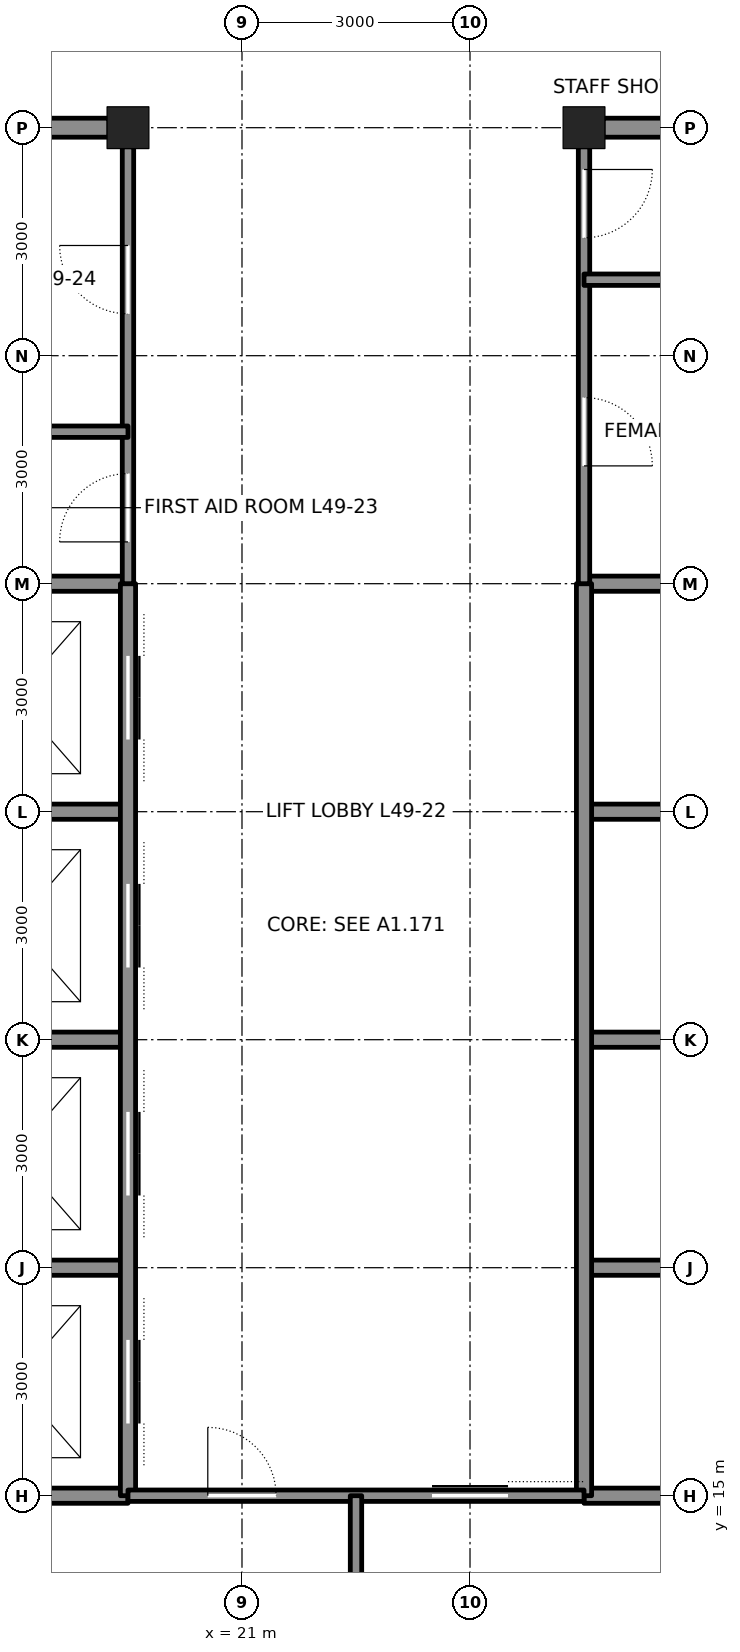
"""IFC4 building model, lengths in metres.
Left out: names, types, materials, properties, quantities, classifications, styles, units other than length and angle.
Written with IfcOpenShell. Run it as: python <this file> out.ifc"""

import sys

from ifc_helpers import new_model, si_unit, direction, frame, frame_2d, origin, origin_2d, place, context, subcontext, project, spatial, rectangle, hollow_rectangle, extrude, element, fill, save


model = new_model("IFC4")
c1 = context("Model", 3, precision=1e-05, world=origin(), true_north=direction((0.0, 1.0)))
c2 = subcontext(c1, "Body", "Model", "MODEL_VIEW")
j1 = project(units=[si_unit("LENGTHUNIT", "METRE"), si_unit("PLANEANGLEUNIT", "RADIAN")], contexts=[c1])
p1 = place(None, origin())
s1 = spatial("IfcSite", under=j1, at=p1, CompositionType="ELEMENT")
p2 = place(p1, origin())
s2 = spatial("IfcBuilding", under=s1, at=p2, CompositionType="ELEMENT")
p3 = place(p2, frame((0.0, 0.0, 222.3)))
s3 = spatial("IfcBuildingStorey", under=s2, at=p3, CompositionType="ELEMENT", Elevation=222.3)
for number, where, z_axis, x_axis in (
    (1, (19.5, 33.0, 0.0), (0.0, 0.0, 1.0), (1.0, 0.0, 0.0)),
    (2, (25.5, 33.0, 0.0), (0.0, 0.0, 1.0), (1.0, 0.0, 0.0)),
):
    element("IfcColumn", number, at=place(p3, frame(where, z_axis=z_axis, x_axis=x_axis)), inside=s3, PredefinedType="COLUMN", context=c2, shape_type="SweptSolid", body=[
        extrude(hollow_rectangle(XDim=0.55, YDim=0.55, WallThickness=0.045, at=origin_2d()), origin(), (0.0, 0.0, 1.0), 4.2),
    ])
for number, where, z_axis, x_axis in (
    (3, (12.0, 15.0, 0.0), (0.0, 0.0, 1.0), (1.0, 0.0, 0.0)),
    (4, (25.5, 15.0, 0.0), (0.0, 0.0, 1.0), (1.0, 0.0, 0.0)),
):
    element("IfcWall", number, at=place(p3, frame(where, z_axis=z_axis, x_axis=x_axis)), inside=s3, PredefinedType="SOLIDWALL", context=c2, shape_type="SweptSolid", body=[
        extrude(rectangle(XDim=7.5, YDim=0.2, at=frame_2d((3.75, 0.0))), origin(), (0.0, 0.0, 1.0), 4.04),
    ])
for number, where, z_axis, x_axis in (
    (5, (16.75, 24.0, 0.0), (0.0, 0.0, 1.0), (1.0, 0.0, 0.0)),
    (6, (25.5, 24.0, 0.0), (0.0, 0.0, 1.0), (1.0, 0.0, 0.0)),
):
    element("IfcWall", number, at=place(p3, frame(where, z_axis=z_axis, x_axis=x_axis)), inside=s3, PredefinedType="SOLIDWALL", context=c2, shape_type="SweptSolid", body=[
        extrude(rectangle(XDim=2.75, YDim=0.2, at=frame_2d((1.375, 0.0))), origin(), (0.0, 0.0, 1.0), 3.09),
    ])
p4 = place(p3, frame((12.0, 27.0, 0.0), z_axis=(0.0, 0.0, 1.0), x_axis=(1.0, 0.0, 0.0)))
e7 = element("IfcWall", 7, at=p4, inside=s3, PredefinedType="SOLIDWALL", context=c2, shape_type="SweptSolid", body=[
    extrude(rectangle(XDim=7.5, YDim=0.2, at=frame_2d((3.75, 0.0))), origin(), (0.0, 0.0, 1.0), 4.04),
])
p5 = place(p4, frame((1.65, 0.0, 0.0)))
e8 = element("IfcOpeningElement", 8, at=p5, cuts=e7, PredefinedType="OPENING", context=c2, shape_type="SweptSolid", body=[
    extrude(rectangle(XDim=1.2, YDim=2.1, at=frame_2d((0.6, 1.05))), frame((0.0, 0.11, 0.0), z_axis=(0.0, -1.0, 0.0), x_axis=(1.0, 0.0, 0.0)), (0.0, 0.0, 1.0), 0.22),
])
p6 = place(p3, frame((25.5, 27.0, 0.0), z_axis=(0.0, 0.0, 1.0), x_axis=(1.0, 0.0, 0.0)))
e9 = element("IfcWall", 9, at=p6, inside=s3, PredefinedType="SOLIDWALL", context=c2, shape_type="SweptSolid", body=[
    extrude(rectangle(XDim=3.0, YDim=0.2, at=frame_2d((1.5, 0.0))), origin(), (0.0, 0.0, 1.0), 4.04),
])
for number, where, z_axis, x_axis in (
    (10, (16.75, 33.0, 0.0), (0.0, 0.0, 1.0), (1.0, 0.0, 0.0)),
    (11, (25.75, 33.0, 0.0), (0.0, 0.0, 1.0), (1.0, 0.0, 0.0)),
):
    element("IfcWall", number, at=place(p3, frame(where, z_axis=z_axis, x_axis=x_axis)), inside=s3, PredefinedType="SOLIDWALL", context=c2, shape_type="SweptSolid", body=[
        extrude(rectangle(XDim=2.5, YDim=0.25, at=frame_2d((1.25, 0.0))), origin(), (0.0, 0.0, 1.0), 3.181),
    ])
p7 = place(p3, frame((16.5, 18.0, 0.0), z_axis=(0.0, 0.0, 1.0), x_axis=(1.0, 0.0, 0.0)))
e12 = element("IfcWall", 12, at=p7, inside=s3, PredefinedType="SOLIDWALL", context=c2, shape_type="SweptSolid", body=[
    extrude(rectangle(XDim=3.0, YDim=0.2, at=frame_2d((1.5, 0.0))), origin(), (0.0, 0.0, 1.0), 4.04),
])
p8 = place(p3, frame((25.5, 18.0, 0.0), z_axis=(0.0, 0.0, 1.0), x_axis=(1.0, 0.0, 0.0)))
e13 = element("IfcWall", 13, at=p8, inside=s3, PredefinedType="SOLIDWALL", context=c2, shape_type="SweptSolid", body=[
    extrude(rectangle(XDim=7.5, YDim=0.2, at=frame_2d((3.75, 0.0))), origin(), (0.0, 0.0, 1.0), 4.04),
])
p9 = place(p8, frame((4.65, 0.0, 0.0)))
e14 = element("IfcOpeningElement", 14, at=p9, cuts=e13, PredefinedType="OPENING", context=c2, shape_type="SweptSolid", body=[
    extrude(rectangle(XDim=1.2, YDim=2.1, at=frame_2d((0.6, 1.05))), frame((0.0, 0.11, 0.0), z_axis=(0.0, -1.0, 0.0), x_axis=(1.0, 0.0, 0.0)), (0.0, 0.0, 1.0), 0.22),
])
for number, where, z_axis, x_axis in (
    (15, (16.75, 21.0, 0.0), (0.0, 0.0, 1.0), (1.0, 0.0, 0.0)),
    (16, (25.5, 21.0, 0.0), (0.0, 0.0, 1.0), (1.0, 0.0, 0.0)),
):
    element("IfcWall", number, at=place(p3, frame(where, z_axis=z_axis, x_axis=x_axis)), inside=s3, PredefinedType="SOLIDWALL", context=c2, shape_type="SweptSolid", body=[
        extrude(rectangle(XDim=2.75, YDim=0.2, at=frame_2d((1.375, 0.0))), origin(), (0.0, 0.0, 1.0), 3.09),
    ])
p10 = place(p3, frame((19.5, 15.0, 0.0), z_axis=(0.0, 0.0, 1.0), x_axis=(0.0, 1.0, 0.0)))
e17 = element("IfcWall", 17, at=p10, inside=s3, PredefinedType="SOLIDWALL", context=c2, shape_type="SweptSolid", body=[
    extrude(rectangle(XDim=12.0, YDim=0.2, at=frame_2d((6.0, 0.0))), origin(), (0.0, 0.0, 1.0), 3.064),
])
p11 = place(p10, frame((0.95, 0.0, 0.0)))
e18 = element("IfcOpeningElement", 18, at=p11, cuts=e17, PredefinedType="OPENING", context=c2, shape_type="SweptSolid", body=[
    extrude(rectangle(XDim=1.1, YDim=2.1, at=frame_2d((0.55, 1.05))), frame((0.0, 0.11, 0.0), z_axis=(0.0, -1.0, 0.0), x_axis=(1.0, 0.0, 0.0)), (0.0, 0.0, 1.0), 0.22),
])
p12 = place(p10, frame((3.95, 0.0, 0.0)))
e19 = element("IfcOpeningElement", 19, at=p12, cuts=e17, PredefinedType="OPENING", context=c2, shape_type="SweptSolid", body=[
    extrude(rectangle(XDim=1.1, YDim=2.1, at=frame_2d((0.55, 1.05))), frame((0.0, 0.11, 0.0), z_axis=(0.0, -1.0, 0.0), x_axis=(1.0, 0.0, 0.0)), (0.0, 0.0, 1.0), 0.22),
])
p13 = place(p10, frame((6.95, 0.0, 0.0)))
e20 = element("IfcOpeningElement", 20, at=p13, cuts=e17, PredefinedType="OPENING", context=c2, shape_type="SweptSolid", body=[
    extrude(rectangle(XDim=1.1, YDim=2.1, at=frame_2d((0.55, 1.05))), frame((0.0, 0.11, 0.0), z_axis=(0.0, -1.0, 0.0), x_axis=(1.0, 0.0, 0.0)), (0.0, 0.0, 1.0), 0.22),
])
p14 = place(p10, frame((9.95, 0.0, 0.0)))
e21 = element("IfcOpeningElement", 21, at=p14, cuts=e17, PredefinedType="OPENING", context=c2, shape_type="SweptSolid", body=[
    extrude(rectangle(XDim=1.1, YDim=2.1, at=frame_2d((0.55, 1.05))), frame((0.0, 0.11, 0.0), z_axis=(0.0, -1.0, 0.0), x_axis=(1.0, 0.0, 0.0)), (0.0, 0.0, 1.0), 0.22),
])
p15 = place(p3, frame((19.5, 27.0, 0.0), z_axis=(0.0, 0.0, 1.0), x_axis=(0.0, 1.0, 0.0)))
e22 = element("IfcWall", 22, at=p15, inside=s3, PredefinedType="PARTITIONING", context=c2, shape_type="SweptSolid", body=[
    extrude(rectangle(XDim=5.75, YDim=0.15, at=frame_2d((2.875, 0.0))), origin(), (0.0, 0.0, 1.0), 3.064),
])
p16 = place(p15, frame((0.55, 0.0, 0.0)))
e23 = element("IfcOpeningElement", 23, at=p16, cuts=e22, PredefinedType="OPENING", context=c2, shape_type="SweptSolid", body=[
    extrude(rectangle(XDim=0.9, YDim=2.1, at=frame_2d((0.45, 1.05))), frame((0.0, 0.085, 0.0), z_axis=(0.0, -1.0, 0.0), x_axis=(1.0, 0.0, 0.0)), (0.0, 0.0, 1.0), 0.17),
])
p17 = place(p15, frame((3.55, 0.0, 0.0)))
e24 = element("IfcOpeningElement", 24, at=p17, cuts=e22, PredefinedType="OPENING", context=c2, shape_type="SweptSolid", body=[
    extrude(rectangle(XDim=0.9, YDim=2.1, at=frame_2d((0.45, 1.05))), frame((0.0, 0.085, 0.0), z_axis=(0.0, -1.0, 0.0), x_axis=(1.0, 0.0, 0.0)), (0.0, 0.0, 1.0), 0.17),
])
p18 = place(p3, frame((25.5, 15.0, 0.0), z_axis=(0.0, 0.0, 1.0), x_axis=(0.0, 1.0, 0.0)))
e25 = element("IfcWall", 25, at=p18, inside=s3, PredefinedType="SOLIDWALL", context=c2, shape_type="SweptSolid", body=[
    extrude(rectangle(XDim=12.0, YDim=0.2, at=frame_2d((6.0, 0.0))), origin(), (0.0, 0.0, 1.0), 3.064),
])
p19 = place(p3, frame((25.5, 27.0, 0.0), z_axis=(0.0, 0.0, 1.0), x_axis=(0.0, 1.0, 0.0)))
e26 = element("IfcWall", 26, at=p19, inside=s3, PredefinedType="PARTITIONING", context=c2, shape_type="SweptSolid", body=[
    extrude(rectangle(XDim=5.75, YDim=0.15, at=frame_2d((2.875, 0.0))), origin(), (0.0, 0.0, 1.0), 3.064),
])
p20 = place(p19, frame((1.55, 0.0, 0.0)))
e27 = element("IfcOpeningElement", 27, at=p20, cuts=e26, PredefinedType="OPENING", context=c2, shape_type="SweptSolid", body=[
    extrude(rectangle(XDim=0.9, YDim=2.1, at=frame_2d((0.45, 1.05))), frame((0.0, 0.085, 0.0), z_axis=(0.0, -1.0, 0.0), x_axis=(1.0, 0.0, 0.0)), (0.0, 0.0, 1.0), 0.17),
])
p21 = place(p19, frame((4.55, 0.0, 0.0)))
e28 = element("IfcOpeningElement", 28, at=p21, cuts=e26, PredefinedType="OPENING", context=c2, shape_type="SweptSolid", body=[
    extrude(rectangle(XDim=0.9, YDim=2.1, at=frame_2d((0.45, 1.05))), frame((0.0, 0.085, 0.0), z_axis=(0.0, -1.0, 0.0), x_axis=(1.0, 0.0, 0.0)), (0.0, 0.0, 1.0), 0.17),
])
p22 = place(p3, frame((19.5, 15.0, 0.0), z_axis=(0.0, 0.0, 1.0), x_axis=(1.0, 0.0, 0.0)))
e29 = element("IfcWall", 29, at=p22, inside=s3, PredefinedType="PARTITIONING", context=c2, shape_type="SweptSolid", body=[
    extrude(rectangle(XDim=6.0, YDim=0.15, at=frame_2d((3.0, 0.0))), origin(), (0.0, 0.0, 1.0), 4.04),
])
p23 = place(p22, frame((4.0, 0.0, 0.0)))
e30 = element("IfcOpeningElement", 30, at=p23, cuts=e29, PredefinedType="OPENING", context=c2, shape_type="SweptSolid", body=[
    extrude(rectangle(XDim=1.0, YDim=2.1, at=frame_2d((0.5, 1.05))), frame((0.0, 0.085, 0.0), z_axis=(0.0, -1.0, 0.0), x_axis=(1.0, 0.0, 0.0)), (0.0, 0.0, 1.0), 0.17),
])
p24 = place(p22, frame((1.05, 0.0, 0.0)))
e31 = element("IfcOpeningElement", 31, at=p24, cuts=e29, PredefinedType="OPENING", context=c2, shape_type="SweptSolid", body=[
    extrude(rectangle(XDim=0.9, YDim=2.1, at=frame_2d((0.45, 1.05))), frame((0.0, 0.085, 0.0), z_axis=(0.0, -1.0, 0.0), x_axis=(1.0, 0.0, 0.0)), (0.0, 0.0, 1.0), 0.17),
])
for number, where, z_axis, x_axis in (
    (32, (22.5, 15.0, 0.0), (0.0, 0.0, 1.0), (0.0, -1.0, 0.0)),
    (33, (16.5, 29.0, 0.0), (0.0, 0.0, 1.0), (1.0, 0.0, 0.0)),
    (34, (25.5, 31.0, 0.0), (0.0, 0.0, 1.0), (1.0, 0.0, 0.0)),
):
    element("IfcWall", number, at=place(p3, frame(where, z_axis=z_axis, x_axis=x_axis)), inside=s3, PredefinedType="PARTITIONING", context=c2, shape_type="SweptSolid", body=[
        extrude(rectangle(XDim=3.0, YDim=0.15, at=frame_2d((1.5, 0.0))), origin(), (0.0, 0.0, 1.0), 4.04),
    ])
p25 = place(p16, origin())
e35 = element("IfcDoor", 35, at=p25, inside=s3, OperationType="SINGLE_SWING_LEFT", PredefinedType="DOOR", context=c2, shape_type="SweptSolid", body=[
    extrude(rectangle(XDim=0.9, YDim=2.1, at=frame_2d((0.45, 1.05))), frame((0.0, 0.025, 0.0), z_axis=(0.0, -1.0, 0.0), x_axis=(1.0, 0.0, 0.0)), (0.0, 0.0, 1.0), 0.05),
])
fill(e23, e35)
p26 = place(p17, origin())
e36 = element("IfcDoor", 36, at=p26, inside=s3, OperationType="SINGLE_SWING_RIGHT", PredefinedType="DOOR", context=c2, shape_type="SweptSolid", body=[
    extrude(rectangle(XDim=0.9, YDim=2.1, at=frame_2d((0.45, 1.05))), frame((0.0, 0.025, 0.0), z_axis=(0.0, -1.0, 0.0), x_axis=(1.0, 0.0, 0.0)), (0.0, 0.0, 1.0), 0.05),
])
fill(e24, e36)
p27 = place(p20, frame((0.9, 0.0, 0.0), z_axis=(0.0, 0.0, 1.0), x_axis=(-1.0, 0.0, 0.0)))
e37 = element("IfcDoor", 37, at=p27, inside=s3, OperationType="SINGLE_SWING_RIGHT", PredefinedType="DOOR", context=c2, shape_type="SweptSolid", body=[
    extrude(rectangle(XDim=0.9, YDim=2.1, at=frame_2d((0.45, 1.05))), frame((0.0, 0.025, 0.0), z_axis=(0.0, -1.0, 0.0), x_axis=(1.0, 0.0, 0.0)), (0.0, 0.0, 1.0), 0.05),
])
fill(e27, e37)
p28 = place(p21, frame((0.9, 0.0, 0.0), z_axis=(0.0, 0.0, 1.0), x_axis=(-1.0, 0.0, 0.0)))
e38 = element("IfcDoor", 38, at=p28, inside=s3, OperationType="SINGLE_SWING_LEFT", PredefinedType="DOOR", context=c2, shape_type="SweptSolid", body=[
    extrude(rectangle(XDim=0.9, YDim=2.1, at=frame_2d((0.45, 1.05))), frame((0.0, 0.025, 0.0), z_axis=(0.0, -1.0, 0.0), x_axis=(1.0, 0.0, 0.0)), (0.0, 0.0, 1.0), 0.05),
])
fill(e28, e38)
p29 = place(p23, origin())
e39 = element("IfcDoor", 39, at=p29, inside=s3, OperationType="SLIDING_TO_LEFT", PredefinedType="DOOR", context=c2, shape_type="SweptSolid", body=[
    extrude(rectangle(XDim=1.0, YDim=2.1, at=frame_2d((0.5, 1.05))), frame((0.0, 0.025, 0.0), z_axis=(0.0, -1.0, 0.0), x_axis=(1.0, 0.0, 0.0)), (0.0, 0.0, 1.0), 0.05),
])
fill(e30, e39)
p30 = place(p24, origin())
e40 = element("IfcDoor", 40, at=p30, inside=s3, OperationType="SINGLE_SWING_LEFT", PredefinedType="DOOR", context=c2, shape_type="SweptSolid", body=[
    extrude(rectangle(XDim=0.9, YDim=2.1, at=frame_2d((0.45, 1.05))), frame((0.0, 0.025, 0.0), z_axis=(0.0, -1.0, 0.0), x_axis=(1.0, 0.0, 0.0)), (0.0, 0.0, 1.0), 0.05),
])
fill(e31, e40)
p31 = place(p11, origin())
e41 = element("IfcDoor", 41, at=p31, inside=s3, OperationType="DOUBLE_DOOR_SLIDING", PredefinedType="DOOR", context=c2, shape_type="SweptSolid", body=[
    extrude(rectangle(XDim=1.1, YDim=2.1, at=frame_2d((0.55, 1.05))), frame((0.0, 0.025, 0.0), z_axis=(0.0, -1.0, 0.0), x_axis=(1.0, 0.0, 0.0)), (0.0, 0.0, 1.0), 0.05),
])
fill(e18, e41)
p32 = place(p12, origin())
e42 = element("IfcDoor", 42, at=p32, inside=s3, OperationType="DOUBLE_DOOR_SLIDING", PredefinedType="DOOR", context=c2, shape_type="SweptSolid", body=[
    extrude(rectangle(XDim=1.1, YDim=2.1, at=frame_2d((0.55, 1.05))), frame((0.0, 0.025, 0.0), z_axis=(0.0, -1.0, 0.0), x_axis=(1.0, 0.0, 0.0)), (0.0, 0.0, 1.0), 0.05),
])
fill(e19, e42)
p33 = place(p13, origin())
e43 = element("IfcDoor", 43, at=p33, inside=s3, OperationType="DOUBLE_DOOR_SLIDING", PredefinedType="DOOR", context=c2, shape_type="SweptSolid", body=[
    extrude(rectangle(XDim=1.1, YDim=2.1, at=frame_2d((0.55, 1.05))), frame((0.0, 0.025, 0.0), z_axis=(0.0, -1.0, 0.0), x_axis=(1.0, 0.0, 0.0)), (0.0, 0.0, 1.0), 0.05),
])
fill(e20, e43)
p34 = place(p14, origin())
e44 = element("IfcDoor", 44, at=p34, inside=s3, OperationType="DOUBLE_DOOR_SLIDING", PredefinedType="DOOR", context=c2, shape_type="SweptSolid", body=[
    extrude(rectangle(XDim=1.1, YDim=2.1, at=frame_2d((0.55, 1.05))), frame((0.0, 0.025, 0.0), z_axis=(0.0, -1.0, 0.0), x_axis=(1.0, 0.0, 0.0)), (0.0, 0.0, 1.0), 0.05),
])
fill(e21, e44)
save(model, sys.argv[1])
